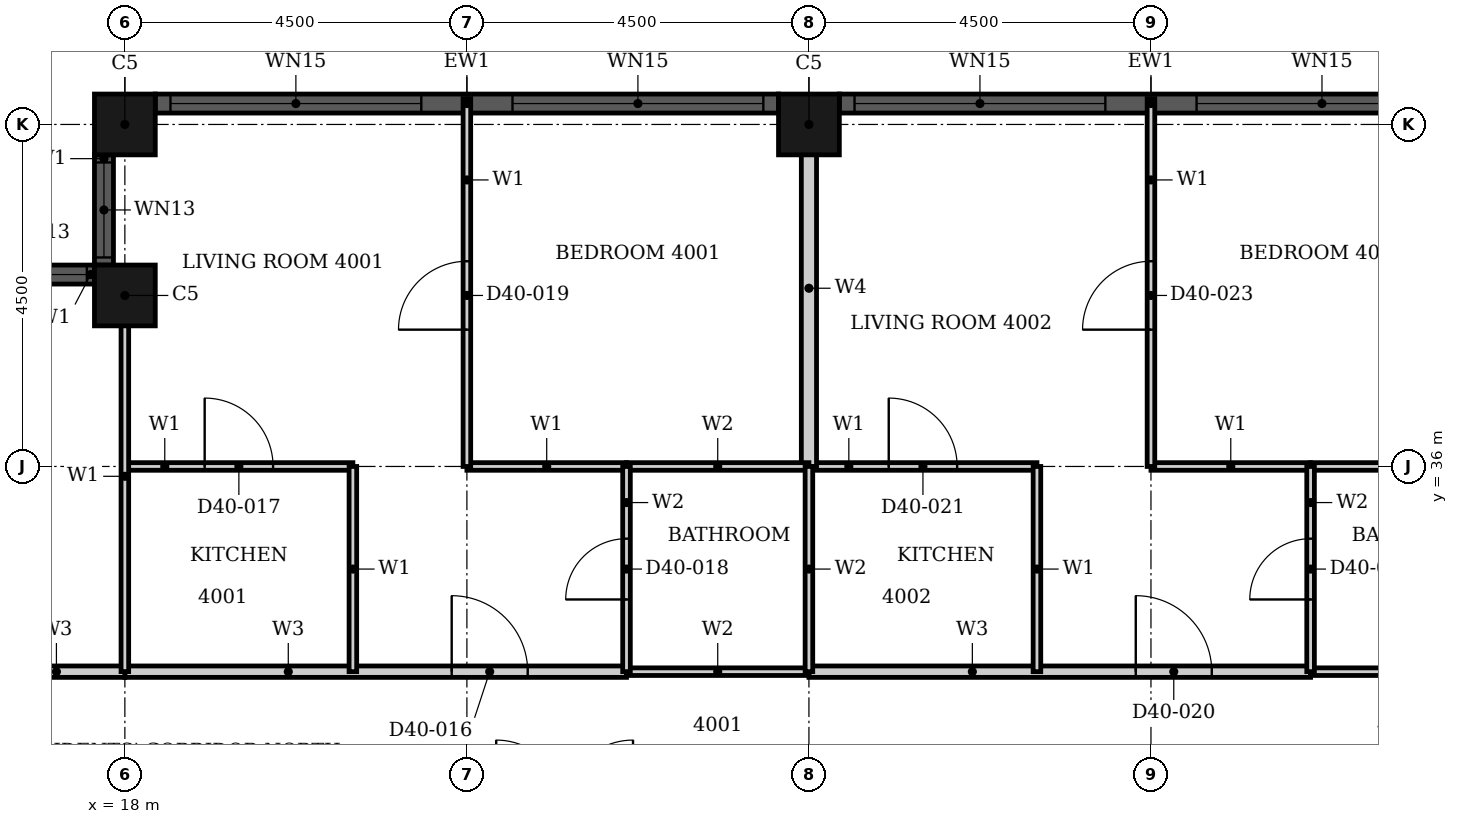
"""IFC4 building model, lengths in metres.
Left out: names, types, materials, properties, quantities, classifications, styles, units other than length and angle.
Written with IfcOpenShell. Run it as: python <this file> out.ifc"""

import sys

from ifc_helpers import new_model, si_unit, direction, frame, frame_2d, origin, origin_2d, place, context, subcontext, project, spatial, rectangle, hollow_rectangle, extrude, element, fill, save


model = new_model("IFC4")
c1 = context("Model", 3, precision=1e-05, world=origin(), true_north=direction((0.0, 1.0)))
c2 = subcontext(c1, "Body", "Model", "MODEL_VIEW")
j1 = project(units=[si_unit("LENGTHUNIT", "METRE"), si_unit("PLANEANGLEUNIT", "RADIAN")], contexts=[c1])
p1 = place(None, origin())
s1 = spatial("IfcSite", under=j1, at=p1, CompositionType="ELEMENT")
p2 = place(p1, origin())
s2 = spatial("IfcBuilding", under=s1, at=p2, CompositionType="ELEMENT")
p3 = place(p2, frame((0.0, 0.0, 161.7)))
s3 = spatial("IfcBuildingStorey", under=s2, at=p3, CompositionType="ELEMENT", Elevation=161.7)
for number, where, z_axis, x_axis in (
    (1, (27.0, 40.5, 0.0), (0.0, 0.0, 1.0), (1.0, 0.0, 0.0)),
    (2, (18.0, 40.5, 0.0), (0.0, 0.0, 1.0), (1.0, 0.0, 0.0)),
    (3, (18.0, 38.25, 0.0), (0.0, 0.0, 1.0), (1.0, 0.0, 0.0)),
):
    element("IfcColumn", number, at=place(p3, frame(where, z_axis=z_axis, x_axis=x_axis)), inside=s3, PredefinedType="COLUMN", context=c2, shape_type="SweptSolid", body=[
        extrude(hollow_rectangle(XDim=0.8, YDim=0.8, WallThickness=0.025, at=origin_2d()), origin(), (0.0, 0.0, 1.0), 3.7),
    ])
p4 = place(p3, frame((35.6, 40.775, 0.0), z_axis=(0.0, 0.0, 1.0), x_axis=(-1.0, 0.0, 0.0)))
e4 = element("IfcWall", 4, at=p4, inside=s3, PredefinedType="SOLIDWALL", context=c2, shape_type="SweptSolid", body=[
    extrude(rectangle(XDim=8.2, YDim=0.25, at=frame_2d((4.1, 0.0))), origin(), (0.0, 0.0, 1.0), 3.7),
])
p5 = place(p4, frame((0.2, 0.0, 0.45)))
e5 = element("IfcOpeningElement", 5, at=p5, cuts=e4, PredefinedType="OPENING", context=c2, shape_type="SweptSolid", body=[
    extrude(rectangle(XDim=3.3, YDim=2.3, at=frame_2d((1.65, 1.15))), frame((0.0, 0.135, 0.0), z_axis=(0.0, -1.0, 0.0), x_axis=(1.0, 0.0, 0.0)), (0.0, 0.0, 1.0), 0.27),
])
p6 = place(p4, frame((4.7, 0.0, 0.45)))
e6 = element("IfcOpeningElement", 6, at=p6, cuts=e4, PredefinedType="OPENING", context=c2, shape_type="SweptSolid", body=[
    extrude(rectangle(XDim=3.3, YDim=2.3, at=frame_2d((1.65, 1.15))), frame((0.0, 0.135, 0.0), z_axis=(0.0, -1.0, 0.0), x_axis=(1.0, 0.0, 0.0)), (0.0, 0.0, 1.0), 0.27),
])
p7 = place(p3, frame((26.6, 40.775, 0.0), z_axis=(0.0, 0.0, 1.0), x_axis=(-1.0, 0.0, 0.0)))
e7 = element("IfcWall", 7, at=p7, inside=s3, PredefinedType="SOLIDWALL", context=c2, shape_type="SweptSolid", body=[
    extrude(rectangle(XDim=8.2, YDim=0.25, at=frame_2d((4.1, 0.0))), origin(), (0.0, 0.0, 1.0), 3.7),
])
p8 = place(p7, frame((0.2, 0.0, 0.45)))
e8 = element("IfcOpeningElement", 8, at=p8, cuts=e7, PredefinedType="OPENING", context=c2, shape_type="SweptSolid", body=[
    extrude(rectangle(XDim=3.3, YDim=2.3, at=frame_2d((1.65, 1.15))), frame((0.0, 0.135, 0.0), z_axis=(0.0, -1.0, 0.0), x_axis=(1.0, 0.0, 0.0)), (0.0, 0.0, 1.0), 0.27),
])
p9 = place(p7, frame((4.7, 0.0, 0.45)))
e9 = element("IfcOpeningElement", 9, at=p9, cuts=e7, PredefinedType="OPENING", context=c2, shape_type="SweptSolid", body=[
    extrude(rectangle(XDim=3.3, YDim=2.3, at=frame_2d((1.65, 1.15))), frame((0.0, 0.135, 0.0), z_axis=(0.0, -1.0, 0.0), x_axis=(1.0, 0.0, 0.0)), (0.0, 0.0, 1.0), 0.27),
])
p10 = place(p3, frame((17.725, 40.1, 0.0), z_axis=(0.0, 0.0, 1.0), x_axis=(0.0, -1.0, 0.0)))
e10 = element("IfcWall", 10, at=p10, inside=s3, PredefinedType="SOLIDWALL", context=c2, shape_type="SweptSolid", body=[
    extrude(rectangle(XDim=1.45, YDim=0.25, at=frame_2d((0.725, 0.0))), origin(), (0.0, 0.0, 1.0), 3.7),
])
p11 = place(p10, frame((0.1, 0.0, 0.9)))
e11 = element("IfcOpeningElement", 11, at=p11, cuts=e10, PredefinedType="OPENING", context=c2, shape_type="SweptSolid", body=[
    extrude(rectangle(XDim=1.25, YDim=1.85, at=frame_2d((0.625, 0.925))), frame((0.0, 0.135, 0.0), z_axis=(0.0, -1.0, 0.0), x_axis=(1.0, 0.0, 0.0)), (0.0, 0.0, 1.0), 0.27),
])
p12 = place(p3, frame((17.6, 38.525, 0.0), z_axis=(0.0, 0.0, 1.0), x_axis=(-1.0, 0.0, 0.0)))
e12 = element("IfcWall", 12, at=p12, inside=s3, PredefinedType="SOLIDWALL", context=c2, shape_type="SweptSolid", body=[
    extrude(rectangle(XDim=1.45, YDim=0.25, at=frame_2d((0.725, 0.0))), origin(), (0.0, 0.0, 1.0), 3.7),
])
p13 = place(p12, frame((0.1, 0.0, 0.9)))
e13 = element("IfcOpeningElement", 13, at=p13, cuts=e12, PredefinedType="OPENING", context=c2, shape_type="SweptSolid", body=[
    extrude(rectangle(XDim=1.25, YDim=1.85, at=frame_2d((0.625, 0.925))), frame((0.0, 0.135, 0.0), z_axis=(0.0, -1.0, 0.0), x_axis=(1.0, 0.0, 0.0)), (0.0, 0.0, 1.0), 0.27),
])
p14 = place(p3, frame((18.0, 33.3, 0.0), z_axis=(0.0, 0.0, 1.0), x_axis=(1.0, 0.0, 0.0)))
e14 = element("IfcWall", 14, at=p14, inside=s3, PredefinedType="PARTITIONING", context=c2, shape_type="SweptSolid", body=[
    extrude(rectangle(XDim=6.6, YDim=0.15, at=frame_2d((3.3, 0.0))), origin(), (0.0, 0.0, 1.0), 3.4),
])
p15 = place(p14, frame((4.3, 0.0, 0.0)))
e15 = element("IfcOpeningElement", 15, at=p15, cuts=e14, PredefinedType="OPENING", context=c2, shape_type="SweptSolid", body=[
    extrude(rectangle(XDim=1.0, YDim=2.2, at=frame_2d((0.5, 1.1))), frame((0.0, 0.085, 0.0), z_axis=(0.0, -1.0, 0.0), x_axis=(1.0, 0.0, 0.0)), (0.0, 0.0, 1.0), 0.17),
])
p16 = place(p3, frame((27.0, 33.3, 0.0), z_axis=(0.0, 0.0, 1.0), x_axis=(1.0, 0.0, 0.0)))
e16 = element("IfcWall", 16, at=p16, inside=s3, PredefinedType="PARTITIONING", context=c2, shape_type="SweptSolid", body=[
    extrude(rectangle(XDim=6.6, YDim=0.15, at=frame_2d((3.3, 0.0))), origin(), (0.0, 0.0, 1.0), 3.4),
])
p17 = place(p16, frame((4.3, 0.0, 0.0)))
e17 = element("IfcOpeningElement", 17, at=p17, cuts=e16, PredefinedType="OPENING", context=c2, shape_type="SweptSolid", body=[
    extrude(rectangle(XDim=1.0, YDim=2.2, at=frame_2d((0.5, 1.1))), frame((0.0, 0.085, 0.0), z_axis=(0.0, -1.0, 0.0), x_axis=(1.0, 0.0, 0.0)), (0.0, 0.0, 1.0), 0.17),
])
p18 = place(p3, frame((16.2, 33.3, 0.0), z_axis=(0.0, 0.0, 1.0), x_axis=(1.0, 0.0, 0.0)))
e18 = element("IfcWall", 18, at=p18, inside=s3, PredefinedType="PARTITIONING", context=c2, shape_type="SweptSolid", body=[
    extrude(rectangle(XDim=1.799, YDim=0.15, at=frame_2d((0.899, 0.0))), origin(), (0.0, 0.0, 1.0), 3.4),
])
p19 = place(p3, frame((22.5, 36.0, 0.0), z_axis=(0.0, 0.0, 1.0), x_axis=(1.0, 0.0, 0.0)))
e19 = element("IfcWall", 19, at=p19, inside=s3, PredefinedType="PARTITIONING", context=c2, shape_type="SweptSolid", body=[
    extrude(rectangle(XDim=2.1, YDim=0.1, at=frame_2d((1.05, 0.0))), origin(), (0.0, 0.0, 1.0), 3.4),
])
p20 = place(p3, frame((18.0, 36.0, 0.0), z_axis=(0.0, 0.0, 1.0), x_axis=(1.0, 0.0, 0.0)))
e20 = element("IfcWall", 20, at=p20, inside=s3, PredefinedType="PARTITIONING", context=c2, shape_type="SweptSolid", body=[
    extrude(rectangle(XDim=3.0, YDim=0.1, at=frame_2d((1.5, 0.0))), origin(), (0.0, 0.0, 1.0), 3.4),
])
p21 = place(p20, frame((1.05, 0.0, 0.0)))
e21 = element("IfcOpeningElement", 21, at=p21, cuts=e20, PredefinedType="OPENING", context=c2, shape_type="SweptSolid", body=[
    extrude(rectangle(XDim=0.9, YDim=2.1, at=frame_2d((0.45, 1.05))), frame((0.0, 0.06, 0.0), z_axis=(0.0, -1.0, 0.0), x_axis=(1.0, 0.0, 0.0)), (0.0, 0.0, 1.0), 0.12),
])
p22 = place(p3, frame((31.5, 36.0, 0.0), z_axis=(0.0, 0.0, 1.0), x_axis=(1.0, 0.0, 0.0)))
e22 = element("IfcWall", 22, at=p22, inside=s3, PredefinedType="PARTITIONING", context=c2, shape_type="SweptSolid", body=[
    extrude(rectangle(XDim=2.1, YDim=0.1, at=frame_2d((1.05, 0.0))), origin(), (0.0, 0.0, 1.0), 3.4),
])
p23 = place(p3, frame((27.0, 36.0, 0.0), z_axis=(0.0, 0.0, 1.0), x_axis=(1.0, 0.0, 0.0)))
e23 = element("IfcWall", 23, at=p23, inside=s3, PredefinedType="PARTITIONING", context=c2, shape_type="SweptSolid", body=[
    extrude(rectangle(XDim=3.0, YDim=0.1, at=frame_2d((1.5, 0.0))), origin(), (0.0, 0.0, 1.0), 3.4),
])
p24 = place(p23, frame((1.05, 0.0, 0.0)))
e24 = element("IfcOpeningElement", 24, at=p24, cuts=e23, PredefinedType="OPENING", context=c2, shape_type="SweptSolid", body=[
    extrude(rectangle(XDim=0.9, YDim=2.1, at=frame_2d((0.45, 1.05))), frame((0.0, 0.06, 0.0), z_axis=(0.0, -1.0, 0.0), x_axis=(1.0, 0.0, 0.0)), (0.0, 0.0, 1.0), 0.12),
])
p25 = place(p3, frame((18.0, 33.301, 0.0), z_axis=(0.0, 0.0, 1.0), x_axis=(0.0, 1.0, 0.0)))
e25 = element("IfcWall", 25, at=p25, inside=s3, PredefinedType="PARTITIONING", context=c2, shape_type="SweptSolid", body=[
    extrude(rectangle(XDim=5.139, YDim=0.1, at=frame_2d((2.569, 0.0))), origin(), (0.0, 0.0, 1.0), 3.4),
])
p26 = place(p3, frame((21.0, 33.3, 0.0), z_axis=(0.0, 0.0, 1.0), x_axis=(0.0, 1.0, 0.0)))
e26 = element("IfcWall", 26, at=p26, inside=s3, PredefinedType="PARTITIONING", context=c2, shape_type="SweptSolid", body=[
    extrude(rectangle(XDim=2.7, YDim=0.1, at=frame_2d((1.35, 0.0))), origin(), (0.0, 0.0, 1.0), 3.4),
])
p27 = place(p3, frame((22.5, 36.0, 0.0), z_axis=(0.0, 0.0, 1.0), x_axis=(0.0, 1.0, 0.0)))
e27 = element("IfcWall", 27, at=p27, inside=s3, PredefinedType="PARTITIONING", context=c2, shape_type="SweptSolid", body=[
    extrude(rectangle(XDim=4.84, YDim=0.1, at=frame_2d((2.42, 0.0))), origin(), (0.0, 0.0, 1.0), 3.4),
])
p28 = place(p27, frame((1.8, 0.0, 0.0)))
e28 = element("IfcOpeningElement", 28, at=p28, cuts=e27, PredefinedType="OPENING", context=c2, shape_type="SweptSolid", body=[
    extrude(rectangle(XDim=0.9, YDim=2.1, at=frame_2d((0.45, 1.05))), frame((0.0, 0.06, 0.0), z_axis=(0.0, -1.0, 0.0), x_axis=(1.0, 0.0, 0.0)), (0.0, 0.0, 1.0), 0.12),
])
p29 = place(p3, frame((30.0, 33.3, 0.0), z_axis=(0.0, 0.0, 1.0), x_axis=(0.0, 1.0, 0.0)))
e29 = element("IfcWall", 29, at=p29, inside=s3, PredefinedType="PARTITIONING", context=c2, shape_type="SweptSolid", body=[
    extrude(rectangle(XDim=2.7, YDim=0.1, at=frame_2d((1.35, 0.0))), origin(), (0.0, 0.0, 1.0), 3.4),
])
p30 = place(p3, frame((31.5, 36.0, 0.0), z_axis=(0.0, 0.0, 1.0), x_axis=(0.0, 1.0, 0.0)))
e30 = element("IfcWall", 30, at=p30, inside=s3, PredefinedType="PARTITIONING", context=c2, shape_type="SweptSolid", body=[
    extrude(rectangle(XDim=4.84, YDim=0.1, at=frame_2d((2.42, 0.0))), origin(), (0.0, 0.0, 1.0), 3.4),
])
p31 = place(p30, frame((1.8, 0.0, 0.0)))
e31 = element("IfcOpeningElement", 31, at=p31, cuts=e30, PredefinedType="OPENING", context=c2, shape_type="SweptSolid", body=[
    extrude(rectangle(XDim=0.9, YDim=2.1, at=frame_2d((0.45, 1.05))), frame((0.0, 0.06, 0.0), z_axis=(0.0, -1.0, 0.0), x_axis=(1.0, 0.0, 0.0)), (0.0, 0.0, 1.0), 0.12),
])
p32 = place(p3, frame((27.0, 36.0, 0.0), z_axis=(0.0, 0.0, 1.0), x_axis=(0.0, 1.0, 0.0)))
e32 = element("IfcWall", 32, at=p32, inside=s3, PredefinedType="PARTITIONING", context=c2, shape_type="SweptSolid", body=[
    extrude(rectangle(XDim=4.69, YDim=0.2, at=frame_2d((2.345, 0.0))), origin(), (0.0, 0.0, 1.0), 3.4),
])
for number, where, z_axis, x_axis in (
    (33, (24.6, 33.3, 0.0), (0.0, 0.0, 1.0), (1.0, 0.0, 0.0)),
    (34, (33.6, 33.3, 0.0), (0.0, 0.0, 1.0), (1.0, 0.0, 0.0)),
    (35, (24.6, 36.0, 0.0), (0.0, 0.0, 1.0), (1.0, 0.0, 0.0)),
    (36, (33.6, 36.0, 0.0), (0.0, 0.0, 1.0), (1.0, 0.0, 0.0)),
):
    element("IfcWall", number, at=place(p3, frame(where, z_axis=z_axis, x_axis=x_axis)), inside=s3, PredefinedType="PARTITIONING", context=c2, shape_type="SweptSolid", body=[
        extrude(rectangle(XDim=2.4, YDim=0.1, at=frame_2d((1.2, 0.0))), origin(), (0.0, 0.0, 1.0), 3.4),
    ])
p33 = place(p3, frame((24.6, 33.3, 0.0), z_axis=(0.0, 0.0, 1.0), x_axis=(0.0, 1.0, 0.0)))
e37 = element("IfcWall", 37, at=p33, inside=s3, PredefinedType="PARTITIONING", context=c2, shape_type="SweptSolid", body=[
    extrude(rectangle(XDim=2.7, YDim=0.1, at=frame_2d((1.35, 0.0))), origin(), (0.0, 0.0, 1.0), 3.4),
])
p34 = place(p33, frame((0.95, 0.0, 0.0)))
e38 = element("IfcOpeningElement", 38, at=p34, cuts=e37, PredefinedType="OPENING", context=c2, shape_type="SweptSolid", body=[
    extrude(rectangle(XDim=0.8, YDim=2.1, at=frame_2d((0.4, 1.05))), frame((0.0, 0.06, 0.0), z_axis=(0.0, -1.0, 0.0), x_axis=(1.0, 0.0, 0.0)), (0.0, 0.0, 1.0), 0.12),
])
p35 = place(p3, frame((27.0, 33.3, 0.0), z_axis=(0.0, 0.0, 1.0), x_axis=(0.0, 1.0, 0.0)))
e39 = element("IfcWall", 39, at=p35, inside=s3, PredefinedType="PARTITIONING", context=c2, shape_type="SweptSolid", body=[
    extrude(rectangle(XDim=2.7, YDim=0.1, at=frame_2d((1.35, 0.0))), origin(), (0.0, 0.0, 1.0), 3.4),
])
p36 = place(p3, frame((33.6, 33.3, 0.0), z_axis=(0.0, 0.0, 1.0), x_axis=(0.0, 1.0, 0.0)))
e40 = element("IfcWall", 40, at=p36, inside=s3, PredefinedType="PARTITIONING", context=c2, shape_type="SweptSolid", body=[
    extrude(rectangle(XDim=2.7, YDim=0.1, at=frame_2d((1.35, 0.0))), origin(), (0.0, 0.0, 1.0), 3.4),
])
p37 = place(p36, frame((0.95, 0.0, 0.0)))
e41 = element("IfcOpeningElement", 41, at=p37, cuts=e40, PredefinedType="OPENING", context=c2, shape_type="SweptSolid", body=[
    extrude(rectangle(XDim=0.8, YDim=2.1, at=frame_2d((0.4, 1.05))), frame((0.0, 0.06, 0.0), z_axis=(0.0, -1.0, 0.0), x_axis=(1.0, 0.0, 0.0)), (0.0, 0.0, 1.0), 0.12),
])
p38 = place(p5, origin())
e42 = element("IfcWindow", 42, at=p38, inside=s3, PartitioningType="SINGLE_PANEL", PredefinedType="WINDOW", context=c2, shape_type="SweptSolid", body=[
    extrude(rectangle(XDim=3.3, YDim=2.3, at=frame_2d((1.65, 1.15))), frame((0.0, 0.03, 0.0), z_axis=(0.0, -1.0, 0.0), x_axis=(1.0, 0.0, 0.0)), (0.0, 0.0, 1.0), 0.06),
])
fill(e5, e42)
p39 = place(p6, origin())
e43 = element("IfcWindow", 43, at=p39, inside=s3, PartitioningType="SINGLE_PANEL", PredefinedType="WINDOW", context=c2, shape_type="SweptSolid", body=[
    extrude(rectangle(XDim=3.3, YDim=2.3, at=frame_2d((1.65, 1.15))), frame((0.0, 0.03, 0.0), z_axis=(0.0, -1.0, 0.0), x_axis=(1.0, 0.0, 0.0)), (0.0, 0.0, 1.0), 0.06),
])
fill(e6, e43)
p40 = place(p8, origin())
e44 = element("IfcWindow", 44, at=p40, inside=s3, PartitioningType="SINGLE_PANEL", PredefinedType="WINDOW", context=c2, shape_type="SweptSolid", body=[
    extrude(rectangle(XDim=3.3, YDim=2.3, at=frame_2d((1.65, 1.15))), frame((0.0, 0.03, 0.0), z_axis=(0.0, -1.0, 0.0), x_axis=(1.0, 0.0, 0.0)), (0.0, 0.0, 1.0), 0.06),
])
fill(e8, e44)
p41 = place(p9, origin())
e45 = element("IfcWindow", 45, at=p41, inside=s3, PartitioningType="SINGLE_PANEL", PredefinedType="WINDOW", context=c2, shape_type="SweptSolid", body=[
    extrude(rectangle(XDim=3.3, YDim=2.3, at=frame_2d((1.65, 1.15))), frame((0.0, 0.03, 0.0), z_axis=(0.0, -1.0, 0.0), x_axis=(1.0, 0.0, 0.0)), (0.0, 0.0, 1.0), 0.06),
])
fill(e9, e45)
p42 = place(p11, origin())
e46 = element("IfcWindow", 46, at=p42, inside=s3, PartitioningType="SINGLE_PANEL", PredefinedType="WINDOW", context=c2, shape_type="SweptSolid", body=[
    extrude(rectangle(XDim=1.25, YDim=1.85, at=frame_2d((0.625, 0.925))), frame((0.0, 0.03, 0.0), z_axis=(0.0, -1.0, 0.0), x_axis=(1.0, 0.0, 0.0)), (0.0, 0.0, 1.0), 0.06),
])
fill(e11, e46)
p43 = place(p13, origin())
e47 = element("IfcWindow", 47, at=p43, inside=s3, PartitioningType="SINGLE_PANEL", PredefinedType="WINDOW", context=c2, shape_type="SweptSolid", body=[
    extrude(rectangle(XDim=1.25, YDim=1.85, at=frame_2d((0.625, 0.925))), frame((0.0, 0.03, 0.0), z_axis=(0.0, -1.0, 0.0), x_axis=(1.0, 0.0, 0.0)), (0.0, 0.0, 1.0), 0.06),
])
fill(e13, e47)
p44 = place(p15, origin())
e48 = element("IfcDoor", 48, at=p44, inside=s3, OperationType="SINGLE_SWING_RIGHT", PredefinedType="DOOR", context=c2, shape_type="SweptSolid", body=[
    extrude(rectangle(XDim=1.0, YDim=2.2, at=frame_2d((0.5, 1.1))), frame((0.0, 0.025, 0.0), z_axis=(0.0, -1.0, 0.0), x_axis=(1.0, 0.0, 0.0)), (0.0, 0.0, 1.0), 0.05),
])
fill(e15, e48)
p45 = place(p21, origin())
e49 = element("IfcDoor", 49, at=p45, inside=s3, OperationType="SINGLE_SWING_LEFT", PredefinedType="DOOR", context=c2, shape_type="SweptSolid", body=[
    extrude(rectangle(XDim=0.9, YDim=2.1, at=frame_2d((0.45, 1.05))), frame((0.0, 0.025, 0.0), z_axis=(0.0, -1.0, 0.0), x_axis=(1.0, 0.0, 0.0)), (0.0, 0.0, 1.0), 0.05),
])
fill(e21, e49)
p46 = place(p34, origin())
e50 = element("IfcDoor", 50, at=p46, inside=s3, OperationType="SINGLE_SWING_LEFT", PredefinedType="DOOR", context=c2, shape_type="SweptSolid", body=[
    extrude(rectangle(XDim=0.8, YDim=2.1, at=frame_2d((0.4, 1.05))), frame((0.0, 0.025, 0.0), z_axis=(0.0, -1.0, 0.0), x_axis=(1.0, 0.0, 0.0)), (0.0, 0.0, 1.0), 0.05),
])
fill(e38, e50)
p47 = place(p28, origin())
e51 = element("IfcDoor", 51, at=p47, inside=s3, OperationType="SINGLE_SWING_LEFT", PredefinedType="DOOR", context=c2, shape_type="SweptSolid", body=[
    extrude(rectangle(XDim=0.9, YDim=2.1, at=frame_2d((0.45, 1.05))), frame((0.0, 0.025, 0.0), z_axis=(0.0, -1.0, 0.0), x_axis=(1.0, 0.0, 0.0)), (0.0, 0.0, 1.0), 0.05),
])
fill(e28, e51)
p48 = place(p17, origin())
e52 = element("IfcDoor", 52, at=p48, inside=s3, OperationType="SINGLE_SWING_LEFT", PredefinedType="DOOR", context=c2, shape_type="SweptSolid", body=[
    extrude(rectangle(XDim=1.0, YDim=2.2, at=frame_2d((0.5, 1.1))), frame((0.0, 0.025, 0.0), z_axis=(0.0, -1.0, 0.0), x_axis=(1.0, 0.0, 0.0)), (0.0, 0.0, 1.0), 0.05),
])
fill(e17, e52)
p49 = place(p24, origin())
e53 = element("IfcDoor", 53, at=p49, inside=s3, OperationType="SINGLE_SWING_LEFT", PredefinedType="DOOR", context=c2, shape_type="SweptSolid", body=[
    extrude(rectangle(XDim=0.9, YDim=2.1, at=frame_2d((0.45, 1.05))), frame((0.0, 0.025, 0.0), z_axis=(0.0, -1.0, 0.0), x_axis=(1.0, 0.0, 0.0)), (0.0, 0.0, 1.0), 0.05),
])
fill(e24, e53)
p50 = place(p37, origin())
e54 = element("IfcDoor", 54, at=p50, inside=s3, OperationType="SINGLE_SWING_LEFT", PredefinedType="DOOR", context=c2, shape_type="SweptSolid", body=[
    extrude(rectangle(XDim=0.8, YDim=2.1, at=frame_2d((0.4, 1.05))), frame((0.0, 0.025, 0.0), z_axis=(0.0, -1.0, 0.0), x_axis=(1.0, 0.0, 0.0)), (0.0, 0.0, 1.0), 0.05),
])
fill(e41, e54)
p51 = place(p31, origin())
e55 = element("IfcDoor", 55, at=p51, inside=s3, OperationType="SINGLE_SWING_LEFT", PredefinedType="DOOR", context=c2, shape_type="SweptSolid", body=[
    extrude(rectangle(XDim=0.9, YDim=2.1, at=frame_2d((0.45, 1.05))), frame((0.0, 0.025, 0.0), z_axis=(0.0, -1.0, 0.0), x_axis=(1.0, 0.0, 0.0)), (0.0, 0.0, 1.0), 0.05),
])
fill(e31, e55)
save(model, sys.argv[1])
